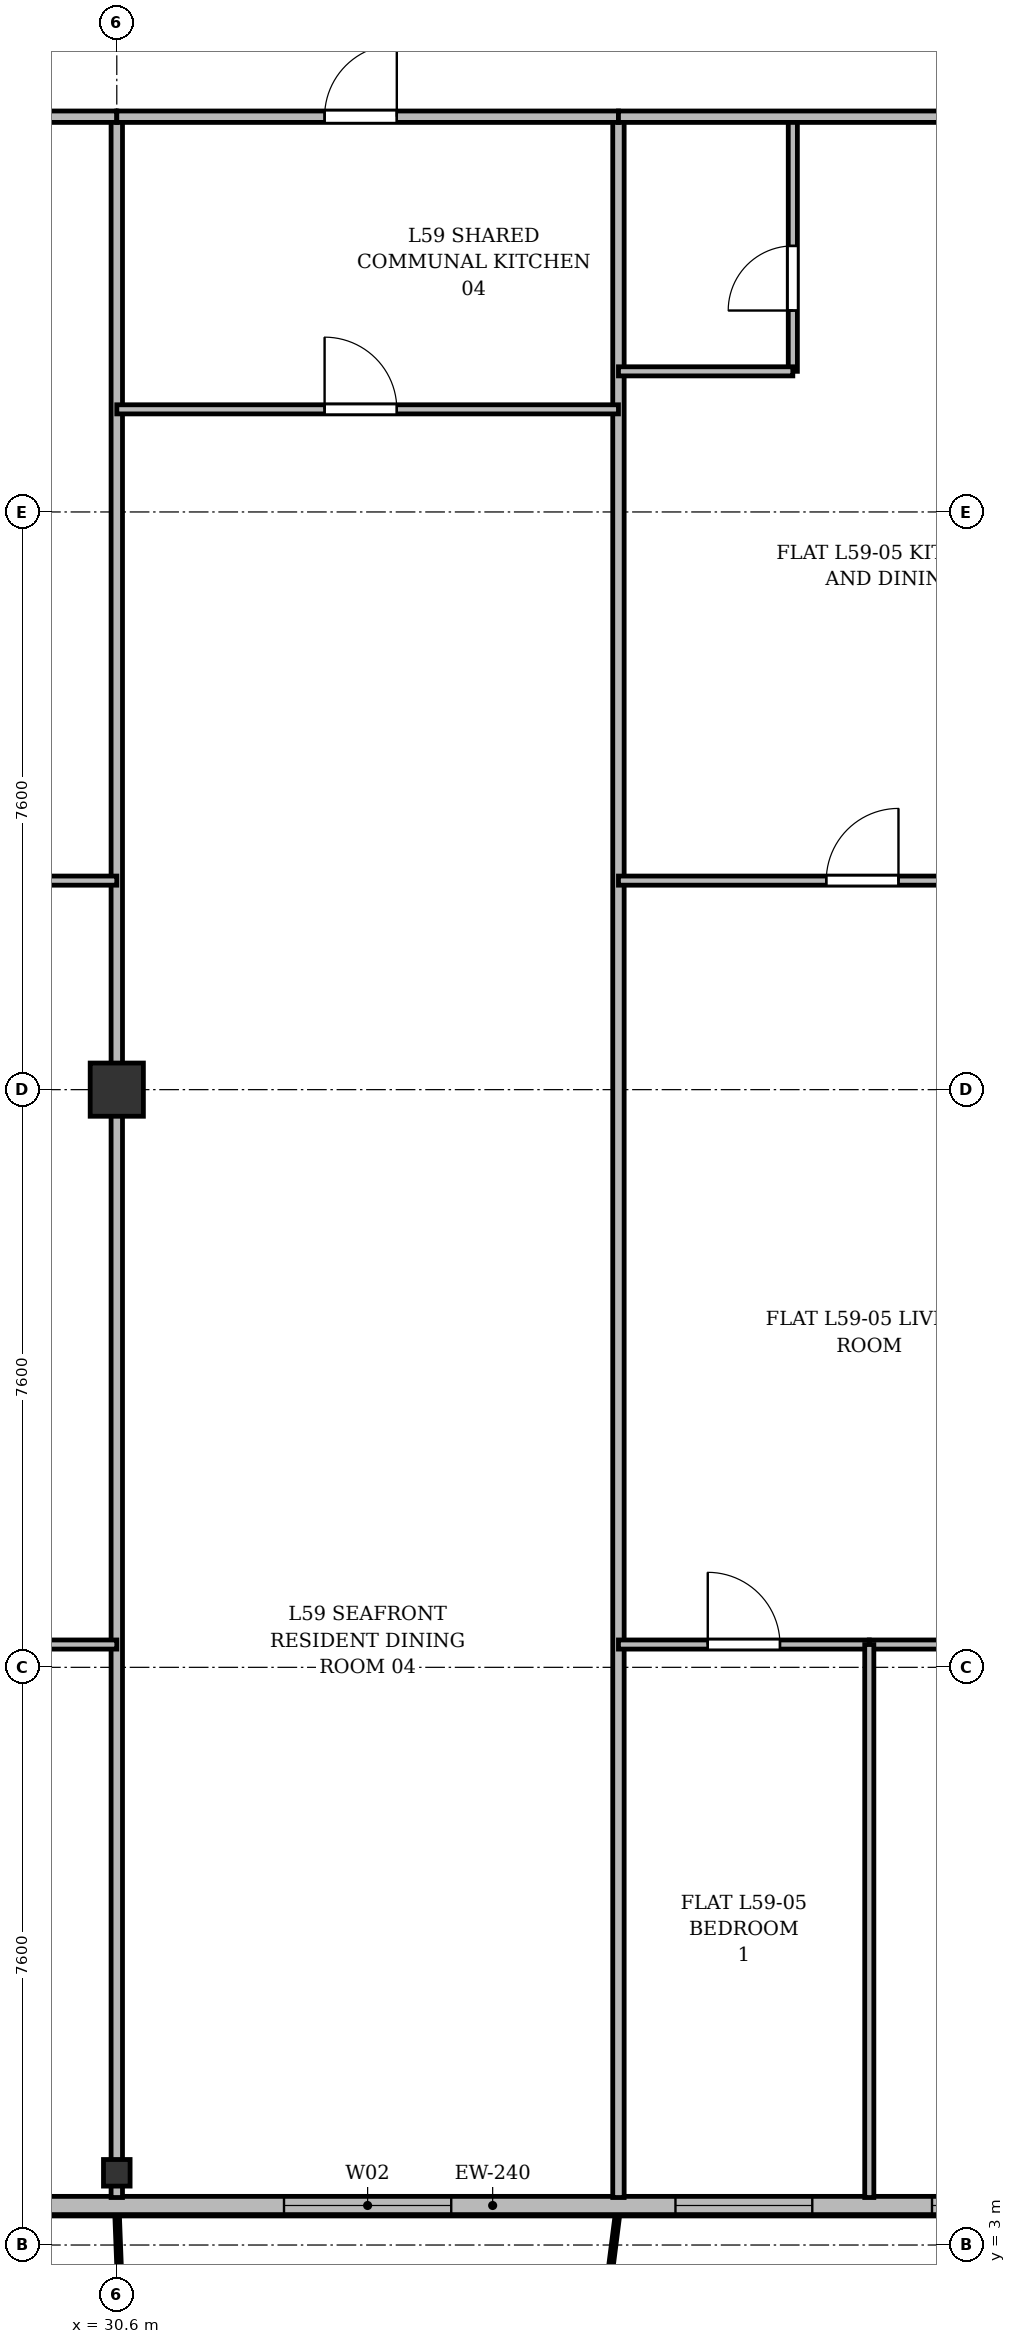
"""IFC4 building model, lengths in metres.
Left out: names, types, materials, properties, quantities, classifications, styles, units other than length and angle.
Written with IfcOpenShell. Run it as: python <this file> out.ifc"""

import sys

from ifc_helpers import new_model, si_unit, direction, frame, frame_2d, origin, origin_2d, place, context, subcontext, project, spatial, rectangle, i_section, extrude, source, transform, mapped, element, fill, save


model = new_model("IFC4")
c1 = context("Model", 3, precision=1e-05, world=origin(), true_north=direction((0.0, 1.0)))
c2 = subcontext(c1, "Body", "Model", "MODEL_VIEW")
j1 = project(units=[si_unit("LENGTHUNIT", "METRE"), si_unit("PLANEANGLEUNIT", "RADIAN")], contexts=[c1])
p1 = place(None, origin())
s1 = spatial("IfcSite", under=j1, at=p1, CompositionType="ELEMENT")
p2 = place(p1, origin())
s2 = spatial("IfcBuilding", under=s1, at=p2, CompositionType="ELEMENT")
p3 = place(p2, frame((0.0, 0.0, 226.5)))
s3 = spatial("IfcBuildingStorey", under=s2, at=p3, CompositionType="ELEMENT", Elevation=226.5)
m1 = source(origin(), c2, "Body", "SweptSolid", [
    extrude(i_section(OverallWidth=0.35, OverallDepth=0.35, WebThickness=0.018, FlangeThickness=0.028, at=origin_2d()), origin(), (0.0, 0.0, 1.0), 3.6),
])
p4 = place(p3, frame((30.6, 3.95, 0.0), z_axis=(0.0, 0.0, 1.0), x_axis=(1.0, 0.0, 0.0)))
e1 = element("IfcColumn", 1, at=p4, inside=s3, PredefinedType="COLUMN", context=c2, shape_type="MappedRepresentation", body=[
    mapped(m1, transform((0.0, 0.0, 0.0), x_axis=(1.0, 0.0, 0.0), y_axis=(0.0, 1.0, 0.0), z_axis=(0.0, 0.0, 1.0), scale=1.0)),
])
m2 = source(origin(), c2, "Body", "SweptSolid", [
    extrude(rectangle(XDim=0.7, YDim=0.7, at=origin_2d()), origin(), (0.0, 0.0, 1.0), 3.6),
])
p5 = place(p3, frame((30.6, 18.2, 0.0), z_axis=(0.0, 0.0, 1.0), x_axis=(1.0, 0.0, 0.0)))
e2 = element("IfcColumn", 2, at=p5, inside=s3, PredefinedType="COLUMN", context=c2, shape_type="MappedRepresentation", body=[
    mapped(m2, transform((0.0, 0.0, 0.0), x_axis=(1.0, 0.0, 0.0), y_axis=(0.0, 1.0, 0.0), z_axis=(0.0, 0.0, 1.0), scale=1.0)),
])
p6 = place(p3, frame((63.4, 3.52, 0.0), z_axis=(0.0, 0.0, 1.0), x_axis=(-1.0, 0.0, 0.0)))
e3 = element("IfcWall", 3, at=p6, inside=s3, PredefinedType="SOLIDWALL", context=c2, shape_type="SweptSolid", body=[
    extrude(rectangle(XDim=52.4, YDim=0.24, at=frame_2d((26.2, 0.0))), origin(), (0.0, 0.0, 1.0), 3.36),
])
p7 = place(p6, frame((1.52, 0.0, 0.9)))
e4 = element("IfcOpeningElement", 4, at=p7, cuts=e3, PredefinedType="OPENING", context=c2, shape_type="SweptSolid", body=[
    extrude(rectangle(XDim=1.65, YDim=1.85, at=frame_2d((0.825, 0.925))), frame((0.0, 0.13, 0.0), z_axis=(0.0, -1.0, 0.0), x_axis=(1.0, 0.0, 0.0)), (0.0, 0.0, 1.0), 0.26),
])
p8 = place(p6, frame((7.6, 0.0, 0.9)))
e5 = element("IfcOpeningElement", 5, at=p8, cuts=e3, PredefinedType="OPENING", context=c2, shape_type="SweptSolid", body=[
    extrude(rectangle(XDim=1.8, YDim=1.8, at=frame_2d((0.9, 0.9))), frame((0.0, 0.13, 0.0), z_axis=(0.0, -1.0, 0.0), x_axis=(1.0, 0.0, 0.0)), (0.0, 0.0, 1.0), 0.26),
])
p9 = place(p6, frame((13.42, 0.0, 0.0)))
e6 = element("IfcOpeningElement", 6, at=p9, cuts=e3, PredefinedType="OPENING", context=c2, shape_type="SweptSolid", body=[
    extrude(rectangle(XDim=1.2, YDim=2.2, at=frame_2d((0.6, 1.1))), frame((0.0, 0.13, 0.0), z_axis=(0.0, -1.0, 0.0), x_axis=(1.0, 0.0, 0.0)), (0.0, 0.0, 1.0), 0.26),
])
p10 = place(p6, frame((15.25, 0.0, 0.9)))
e7 = element("IfcOpeningElement", 7, at=p10, cuts=e3, PredefinedType="OPENING", context=c2, shape_type="SweptSolid", body=[
    extrude(rectangle(XDim=1.5, YDim=1.75, at=frame_2d((0.75, 0.875))), frame((0.0, 0.13, 0.0), z_axis=(0.0, -1.0, 0.0), x_axis=(1.0, 0.0, 0.0)), (0.0, 0.0, 1.0), 0.26),
])
p11 = place(p6, frame((17.4, 0.0, 0.9)))
e8 = element("IfcOpeningElement", 8, at=p11, cuts=e3, PredefinedType="OPENING", context=c2, shape_type="SweptSolid", body=[
    extrude(rectangle(XDim=2.0, YDim=1.95, at=frame_2d((1.0, 0.975))), frame((0.0, 0.13, 0.0), z_axis=(0.0, -1.0, 0.0), x_axis=(1.0, 0.0, 0.0)), (0.0, 0.0, 1.0), 0.26),
])
p12 = place(p6, frame((20.425, 0.0, 0.9)))
e9 = element("IfcOpeningElement", 9, at=p12, cuts=e3, PredefinedType="OPENING", context=c2, shape_type="SweptSolid", body=[
    extrude(rectangle(XDim=1.65, YDim=1.85, at=frame_2d((0.825, 0.925))), frame((0.0, 0.13, 0.0), z_axis=(0.0, -1.0, 0.0), x_axis=(1.0, 0.0, 0.0)), (0.0, 0.0, 1.0), 0.26),
])
p13 = place(p6, frame((23.65, 0.0, 0.9)))
e10 = element("IfcOpeningElement", 10, at=p13, cuts=e3, PredefinedType="OPENING", context=c2, shape_type="SweptSolid", body=[
    extrude(rectangle(XDim=1.8, YDim=1.8, at=frame_2d((0.9, 0.9))), frame((0.0, 0.13, 0.0), z_axis=(0.0, -1.0, 0.0), x_axis=(1.0, 0.0, 0.0)), (0.0, 0.0, 1.0), 0.26),
])
p14 = place(p6, frame((28.4, 0.0, 0.9)))
e11 = element("IfcOpeningElement", 11, at=p14, cuts=e3, PredefinedType="OPENING", context=c2, shape_type="SweptSolid", body=[
    extrude(rectangle(XDim=2.2, YDim=1.8, at=frame_2d((1.1, 0.9))), frame((0.0, 0.13, 0.0), z_axis=(0.0, -1.0, 0.0), x_axis=(1.0, 0.0, 0.0)), (0.0, 0.0, 1.0), 0.26),
])
p15 = place(p6, frame((33.85, 0.0, 0.9)))
e12 = element("IfcOpeningElement", 12, at=p15, cuts=e3, PredefinedType="OPENING", context=c2, shape_type="SweptSolid", body=[
    extrude(rectangle(XDim=1.5, YDim=1.75, at=frame_2d((0.75, 0.875))), frame((0.0, 0.13, 0.0), z_axis=(0.0, -1.0, 0.0), x_axis=(1.0, 0.0, 0.0)), (0.0, 0.0, 1.0), 0.26),
])
p16 = place(p6, frame((37.2, 0.0, 0.9)))
e13 = element("IfcOpeningElement", 13, at=p16, cuts=e3, PredefinedType="OPENING", context=c2, shape_type="SweptSolid", body=[
    extrude(rectangle(XDim=2.0, YDim=1.95, at=frame_2d((1.0, 0.975))), frame((0.0, 0.13, 0.0), z_axis=(0.0, -1.0, 0.0), x_axis=(1.0, 0.0, 0.0)), (0.0, 0.0, 1.0), 0.26),
])
p17 = place(p6, frame((41.09, 0.0, 0.0)))
e14 = element("IfcOpeningElement", 14, at=p17, cuts=e3, PredefinedType="OPENING", context=c2, shape_type="SweptSolid", body=[
    extrude(rectangle(XDim=1.2, YDim=2.2, at=frame_2d((0.6, 1.1))), frame((0.0, 0.13, 0.0), z_axis=(0.0, -1.0, 0.0), x_axis=(1.0, 0.0, 0.0)), (0.0, 0.0, 1.0), 0.26),
])
p18 = place(p6, frame((43.0, 0.0, 0.9)))
e15 = element("IfcOpeningElement", 15, at=p18, cuts=e3, PredefinedType="OPENING", context=c2, shape_type="SweptSolid", body=[
    extrude(rectangle(XDim=1.8, YDim=1.8, at=frame_2d((0.9, 0.9))), frame((0.0, 0.13, 0.0), z_axis=(0.0, -1.0, 0.0), x_axis=(1.0, 0.0, 0.0)), (0.0, 0.0, 1.0), 0.26),
])
p19 = place(p6, frame((45.75, 0.0, 0.9)))
e16 = element("IfcOpeningElement", 16, at=p19, cuts=e3, PredefinedType="OPENING", context=c2, shape_type="SweptSolid", body=[
    extrude(rectangle(XDim=1.5, YDim=1.75, at=frame_2d((0.75, 0.875))), frame((0.0, 0.13, 0.0), z_axis=(0.0, -1.0, 0.0), x_axis=(1.0, 0.0, 0.0)), (0.0, 0.0, 1.0), 0.26),
])
p20 = place(p6, frame((49.305, 0.0, 0.9)))
e17 = element("IfcOpeningElement", 17, at=p20, cuts=e3, PredefinedType="OPENING", context=c2, shape_type="SweptSolid", body=[
    extrude(rectangle(XDim=1.5, YDim=1.75, at=frame_2d((0.75, 0.875))), frame((0.0, 0.13, 0.0), z_axis=(0.0, -1.0, 0.0), x_axis=(1.0, 0.0, 0.0)), (0.0, 0.0, 1.0), 0.26),
])
p21 = place(p3, frame((30.6, 3.625, 0.0), z_axis=(0.0, 0.0, 1.0), x_axis=(0.0, 1.0, 0.0)))
e18 = element("IfcWall", 18, at=p21, inside=s3, PredefinedType="PARTITIONING", context=c2, shape_type="SweptSolid", body=[
    extrude(rectangle(XDim=27.375, YDim=0.15, at=frame_2d((13.688, 0.0))), origin(), (0.0, 0.0, 1.0), 2.86),
])
p22 = place(p3, frame((37.2, 3.625, 0.0), z_axis=(0.0, 0.0, 1.0), x_axis=(0.0, 1.0, 0.0)))
e19 = element("IfcWall", 19, at=p22, inside=s3, PredefinedType="PARTITIONING", context=c2, shape_type="SweptSolid", body=[
    extrude(rectangle(XDim=27.375, YDim=0.15, at=frame_2d((13.688, 0.0))), origin(), (0.0, 0.0, 1.0), 2.91),
])
p23 = place(p3, frame((23.4, 20.95, 0.0), z_axis=(0.0, 0.0, 1.0), x_axis=(1.0, 0.0, 0.0)))
e20 = element("IfcWall", 20, at=p23, inside=s3, PredefinedType="PARTITIONING", context=c2, shape_type="SweptSolid", body=[
    extrude(rectangle(XDim=7.2, YDim=0.12, at=frame_2d((3.6, 0.0))), origin(), (0.0, 0.0, 1.0), 2.86),
])
p24 = place(p23, frame((3.125, 0.0, 0.0)))
e21 = element("IfcOpeningElement", 21, at=p24, cuts=e20, PredefinedType="OPENING", context=c2, shape_type="SweptSolid", body=[
    extrude(rectangle(XDim=0.95, YDim=2.15, at=frame_2d((0.475, 1.075))), frame((0.0, 0.07, 0.0), z_axis=(0.0, -1.0, 0.0), x_axis=(1.0, 0.0, 0.0)), (0.0, 0.0, 1.0), 0.14),
])
p25 = place(p3, frame((23.4, 31.0, 0.0), z_axis=(0.0, 0.0, 1.0), x_axis=(1.0, 0.0, 0.0)))
e22 = element("IfcWall", 22, at=p25, inside=s3, PredefinedType="PARTITIONING", context=c2, shape_type="SweptSolid", body=[
    extrude(rectangle(XDim=7.2, YDim=0.15, at=frame_2d((3.6, 0.0))), origin(), (0.0, 0.0, 1.0), 2.86),
])
p26 = place(p25, frame((4.706, 0.0, 0.0)))
e23 = element("IfcOpeningElement", 23, at=p26, cuts=e22, PredefinedType="OPENING", context=c2, shape_type="SweptSolid", body=[
    extrude(rectangle(XDim=0.95, YDim=2.15, at=frame_2d((0.475, 1.075))), frame((0.0, 0.085, 0.0), z_axis=(0.0, -1.0, 0.0), x_axis=(1.0, 0.0, 0.0)), (0.0, 0.0, 1.0), 0.17),
])
p27 = place(p3, frame((27.0, 10.9, 0.0), z_axis=(0.0, 0.0, 1.0), x_axis=(1.0, 0.0, 0.0)))
e24 = element("IfcWall", 24, at=p27, inside=s3, PredefinedType="PARTITIONING", context=c2, shape_type="SweptSolid", body=[
    extrude(rectangle(XDim=3.6, YDim=0.12, at=frame_2d((1.8, 0.0))), origin(), (0.0, 0.0, 1.0), 2.86),
])
p28 = place(p27, frame((1.325, 0.0, 0.0)))
e25 = element("IfcOpeningElement", 25, at=p28, cuts=e24, PredefinedType="OPENING", context=c2, shape_type="SweptSolid", body=[
    extrude(rectangle(XDim=0.95, YDim=2.15, at=frame_2d((0.475, 1.075))), frame((0.0, 0.07, 0.0), z_axis=(0.0, -1.0, 0.0), x_axis=(1.0, 0.0, 0.0)), (0.0, 0.0, 1.0), 0.14),
])
p29 = place(p3, frame((30.6, 31.0, 0.0), z_axis=(0.0, 0.0, 1.0), x_axis=(1.0, 0.0, 0.0)))
e26 = element("IfcWall", 26, at=p29, inside=s3, PredefinedType="PARTITIONING", context=c2, shape_type="SweptSolid", body=[
    extrude(rectangle(XDim=6.6, YDim=0.15, at=frame_2d((3.3, 0.0))), origin(), (0.0, 0.0, 1.0), 2.86),
])
p30 = place(p29, frame((2.734, 0.0, 0.0)))
e27 = element("IfcOpeningElement", 27, at=p30, cuts=e26, PredefinedType="OPENING", context=c2, shape_type="SweptSolid", body=[
    extrude(rectangle(XDim=0.95, YDim=2.15, at=frame_2d((0.475, 1.075))), frame((0.0, 0.085, 0.0), z_axis=(0.0, -1.0, 0.0), x_axis=(1.0, 0.0, 0.0)), (0.0, 0.0, 1.0), 0.17),
])
p31 = place(p3, frame((30.6, 27.15, 0.0), z_axis=(0.0, 0.0, 1.0), x_axis=(1.0, 0.0, 0.0)))
e28 = element("IfcWall", 28, at=p31, inside=s3, PredefinedType="PARTITIONING", context=c2, shape_type="SweptSolid", body=[
    extrude(rectangle(XDim=6.6, YDim=0.12, at=frame_2d((3.3, 0.0))), origin(), (0.0, 0.0, 1.0), 2.86),
])
p32 = place(p31, frame((2.734, 0.0, 0.0)))
e29 = element("IfcOpeningElement", 29, at=p32, cuts=e28, PredefinedType="OPENING", context=c2, shape_type="SweptSolid", body=[
    extrude(rectangle(XDim=0.95, YDim=2.15, at=frame_2d((0.475, 1.075))), frame((0.0, 0.07, 0.0), z_axis=(0.0, -1.0, 0.0), x_axis=(1.0, 0.0, 0.0)), (0.0, 0.0, 1.0), 0.14),
])
p33 = place(p3, frame((37.2, 20.95, 0.0), z_axis=(0.0, 0.0, 1.0), x_axis=(1.0, 0.0, 0.0)))
e30 = element("IfcWall", 30, at=p33, inside=s3, PredefinedType="PARTITIONING", context=c2, shape_type="SweptSolid", body=[
    extrude(rectangle(XDim=6.6, YDim=0.12, at=frame_2d((3.3, 0.0))), origin(), (0.0, 0.0, 1.0), 2.86),
])
p34 = place(p33, frame((2.734, 0.0, 0.0)))
e31 = element("IfcOpeningElement", 31, at=p34, cuts=e30, PredefinedType="OPENING", context=c2, shape_type="SweptSolid", body=[
    extrude(rectangle(XDim=0.95, YDim=2.15, at=frame_2d((0.475, 1.075))), frame((0.0, 0.07, 0.0), z_axis=(0.0, -1.0, 0.0), x_axis=(1.0, 0.0, 0.0)), (0.0, 0.0, 1.0), 0.14),
])
p35 = place(p3, frame((39.494, 27.65, 0.0), z_axis=(0.0, 0.0, 1.0), x_axis=(0.0, 1.0, 0.0)))
e32 = element("IfcWall", 32, at=p35, inside=s3, PredefinedType="PARTITIONING", context=c2, shape_type="SweptSolid", body=[
    extrude(rectangle(XDim=3.35, YDim=0.12, at=frame_2d((1.675, 0.0))), origin(), (0.0, 0.0, 1.0), 3.36),
])
p36 = place(p35, frame((0.8, 0.0, 0.0)))
e33 = element("IfcOpeningElement", 33, at=p36, cuts=e32, PredefinedType="OPENING", context=c2, shape_type="SweptSolid", body=[
    extrude(rectangle(XDim=0.85, YDim=2.1, at=frame_2d((0.425, 1.05))), frame((0.0, 0.07, 0.0), z_axis=(0.0, -1.0, 0.0), x_axis=(1.0, 0.0, 0.0)), (0.0, 0.0, 1.0), 0.14),
])
p37 = place(p3, frame((37.2, 27.65, 0.0), z_axis=(0.0, 0.0, 1.0), x_axis=(1.0, 0.0, 0.0)))
e34 = element("IfcWall", 34, at=p37, inside=s3, PredefinedType="PARTITIONING", context=c2, shape_type="SweptSolid", body=[
    extrude(rectangle(XDim=2.294, YDim=0.12, at=frame_2d((1.147, 0.0))), origin(), (0.0, 0.0, 1.0), 3.36),
])
p38 = place(p3, frame((37.2, 31.0, 0.0), z_axis=(0.0, 0.0, 1.0), x_axis=(1.0, 0.0, 0.0)))
e35 = element("IfcWall", 35, at=p38, inside=s3, PredefinedType="PARTITIONING", context=c2, shape_type="SweptSolid", body=[
    extrude(rectangle(XDim=6.6, YDim=0.15, at=frame_2d((3.3, 0.0))), origin(), (0.0, 0.0, 1.0), 2.86),
])
p39 = place(p38, frame((4.337, 0.0, 0.0)))
e36 = element("IfcOpeningElement", 36, at=p39, cuts=e35, PredefinedType="OPENING", context=c2, shape_type="SweptSolid", body=[
    extrude(rectangle(XDim=0.95, YDim=2.15, at=frame_2d((0.475, 1.075))), frame((0.0, 0.085, 0.0), z_axis=(0.0, -1.0, 0.0), x_axis=(1.0, 0.0, 0.0)), (0.0, 0.0, 1.0), 0.17),
])
p40 = place(p3, frame((37.2, 10.9, 0.0), z_axis=(0.0, 0.0, 1.0), x_axis=(1.0, 0.0, 0.0)))
e37 = element("IfcWall", 37, at=p40, inside=s3, PredefinedType="PARTITIONING", context=c2, shape_type="SweptSolid", body=[
    extrude(rectangle(XDim=3.3, YDim=0.12, at=frame_2d((1.65, 0.0))), origin(), (0.0, 0.0, 1.0), 3.06),
])
p41 = place(p40, frame((1.175, 0.0, 0.0)))
e38 = element("IfcOpeningElement", 38, at=p41, cuts=e37, PredefinedType="OPENING", context=c2, shape_type="SweptSolid", body=[
    extrude(rectangle(XDim=0.95, YDim=2.15, at=frame_2d((0.475, 1.075))), frame((0.0, 0.07, 0.0), z_axis=(0.0, -1.0, 0.0), x_axis=(1.0, 0.0, 0.0)), (0.0, 0.0, 1.0), 0.14),
])
p42 = place(p3, frame((40.5, 10.9, 0.0), z_axis=(0.0, 0.0, 1.0), x_axis=(1.0, 0.0, 0.0)))
e39 = element("IfcWall", 39, at=p42, inside=s3, PredefinedType="PARTITIONING", context=c2, shape_type="SweptSolid", body=[
    extrude(rectangle(XDim=3.3, YDim=0.12, at=frame_2d((1.65, 0.0))), origin(), (0.0, 0.0, 1.0), 2.86),
])
p43 = place(p42, frame((1.175, 0.0, 0.0)))
e40 = element("IfcOpeningElement", 40, at=p43, cuts=e39, PredefinedType="OPENING", context=c2, shape_type="SweptSolid", body=[
    extrude(rectangle(XDim=0.95, YDim=2.15, at=frame_2d((0.475, 1.075))), frame((0.0, 0.07, 0.0), z_axis=(0.0, -1.0, 0.0), x_axis=(1.0, 0.0, 0.0)), (0.0, 0.0, 1.0), 0.14),
])
p44 = place(p3, frame((40.5, 3.625, 0.0), z_axis=(0.0, 0.0, 1.0), x_axis=(0.0, 1.0, 0.0)))
e41 = element("IfcWall", 41, at=p44, inside=s3, PredefinedType="PARTITIONING", context=c2, shape_type="SweptSolid", body=[
    extrude(rectangle(XDim=7.275, YDim=0.12, at=frame_2d((3.637, 0.0))), origin(), (0.0, 0.0, 1.0), 2.91),
])
m3 = source(origin(), c2, "Body", "SweptSolid", [
    extrude(rectangle(XDim=1.65, YDim=1.85, at=frame_2d((0.825, 0.925))), frame((0.0, 0.03, 0.0), z_axis=(0.0, -1.0, 0.0), x_axis=(1.0, 0.0, 0.0)), (0.0, 0.0, 1.0), 0.06),
])
p45 = place(p12, origin())
e42 = element("IfcWindow", 42, at=p45, inside=s3, PartitioningType="SINGLE_PANEL", PredefinedType="WINDOW", context=c2, shape_type="MappedRepresentation", body=[
    mapped(m3, transform((0.0, 0.0, 0.0), x_axis=(1.0, 0.0, 0.0), y_axis=(0.0, 1.0, 0.0), z_axis=(0.0, 0.0, 1.0), scale=1.0)),
])
fill(e9, e42)
m4 = source(origin(), c2, "Body", "SweptSolid", [
    extrude(rectangle(XDim=1.8, YDim=1.8, at=frame_2d((0.9, 0.9))), frame((0.0, 0.03, 0.0), z_axis=(0.0, -1.0, 0.0), x_axis=(1.0, 0.0, 0.0)), (0.0, 0.0, 1.0), 0.06),
])
p46 = place(p13, origin())
e43 = element("IfcWindow", 43, at=p46, inside=s3, PartitioningType="SINGLE_PANEL", PredefinedType="WINDOW", context=c2, shape_type="MappedRepresentation", body=[
    mapped(m4, transform((0.0, 0.0, 0.0), x_axis=(1.0, 0.0, 0.0), y_axis=(0.0, 1.0, 0.0), z_axis=(0.0, 0.0, 1.0), scale=1.0)),
])
fill(e10, e43)
m5 = source(origin(), c2, "Body", "SweptSolid", [
    extrude(rectangle(XDim=2.2, YDim=1.8, at=frame_2d((1.1, 0.9))), frame((0.0, 0.03, 0.0), z_axis=(0.0, -1.0, 0.0), x_axis=(1.0, 0.0, 0.0)), (0.0, 0.0, 1.0), 0.06),
])
p47 = place(p14, origin())
e44 = element("IfcWindow", 44, at=p47, inside=s3, PartitioningType="SINGLE_PANEL", PredefinedType="WINDOW", context=c2, shape_type="MappedRepresentation", body=[
    mapped(m5, transform((0.0, 0.0, 0.0), x_axis=(1.0, 0.0, 0.0), y_axis=(0.0, 1.0, 0.0), z_axis=(0.0, 0.0, 1.0), scale=1.0)),
])
fill(e11, e44)
m6 = source(origin(), c2, "Body", "SweptSolid", [
    extrude(rectangle(XDim=0.95, YDim=2.15, at=frame_2d((0.475, 1.075))), frame((0.0, 0.025, 0.0), z_axis=(0.0, -1.0, 0.0), x_axis=(1.0, 0.0, 0.0)), (0.0, 0.0, 1.0), 0.05),
])
p48 = place(p30, origin())
e45 = element("IfcDoor", 45, at=p48, inside=s3, OperationType="SINGLE_SWING_RIGHT", PredefinedType="DOOR", context=c2, shape_type="MappedRepresentation", body=[
    mapped(m6, transform((0.0, 0.0, 0.0), x_axis=(1.0, 0.0, 0.0), y_axis=(0.0, 1.0, 0.0), z_axis=(0.0, 0.0, 1.0), scale=1.0)),
])
fill(e27, e45)
p49 = place(p32, origin())
e46 = element("IfcDoor", 46, at=p49, inside=s3, OperationType="SINGLE_SWING_LEFT", PredefinedType="DOOR", context=c2, shape_type="MappedRepresentation", body=[
    mapped(m6, transform((0.0, 0.0, 0.0), x_axis=(1.0, 0.0, 0.0), y_axis=(0.0, 1.0, 0.0), z_axis=(0.0, 0.0, 1.0), scale=1.0)),
])
fill(e29, e46)
p50 = place(p34, origin())
e47 = element("IfcDoor", 47, at=p50, inside=s3, OperationType="SINGLE_SWING_RIGHT", PredefinedType="DOOR", context=c2, shape_type="MappedRepresentation", body=[
    mapped(m6, transform((0.0, 0.0, 0.0), x_axis=(1.0, 0.0, 0.0), y_axis=(0.0, 1.0, 0.0), z_axis=(0.0, 0.0, 1.0), scale=1.0)),
])
fill(e31, e47)
m7 = source(origin(), c2, "Body", "SweptSolid", [
    extrude(rectangle(XDim=0.85, YDim=2.1, at=frame_2d((0.425, 1.05))), frame((0.0, 0.025, 0.0), z_axis=(0.0, -1.0, 0.0), x_axis=(1.0, 0.0, 0.0)), (0.0, 0.0, 1.0), 0.05),
])
p51 = place(p36, origin())
e48 = element("IfcDoor", 48, at=p51, inside=s3, OperationType="SINGLE_SWING_LEFT", PredefinedType="DOOR", context=c2, shape_type="MappedRepresentation", body=[
    mapped(m7, transform((0.0, 0.0, 0.0), x_axis=(1.0, 0.0, 0.0), y_axis=(0.0, 1.0, 0.0), z_axis=(0.0, 0.0, 1.0), scale=1.0)),
])
fill(e33, e48)
p52 = place(p41, origin())
e49 = element("IfcDoor", 49, at=p52, inside=s3, OperationType="SINGLE_SWING_LEFT", PredefinedType="DOOR", context=c2, shape_type="MappedRepresentation", body=[
    mapped(m6, transform((0.0, 0.0, 0.0), x_axis=(1.0, 0.0, 0.0), y_axis=(0.0, 1.0, 0.0), z_axis=(0.0, 0.0, 1.0), scale=1.0)),
])
fill(e38, e49)
save(model, sys.argv[1])
